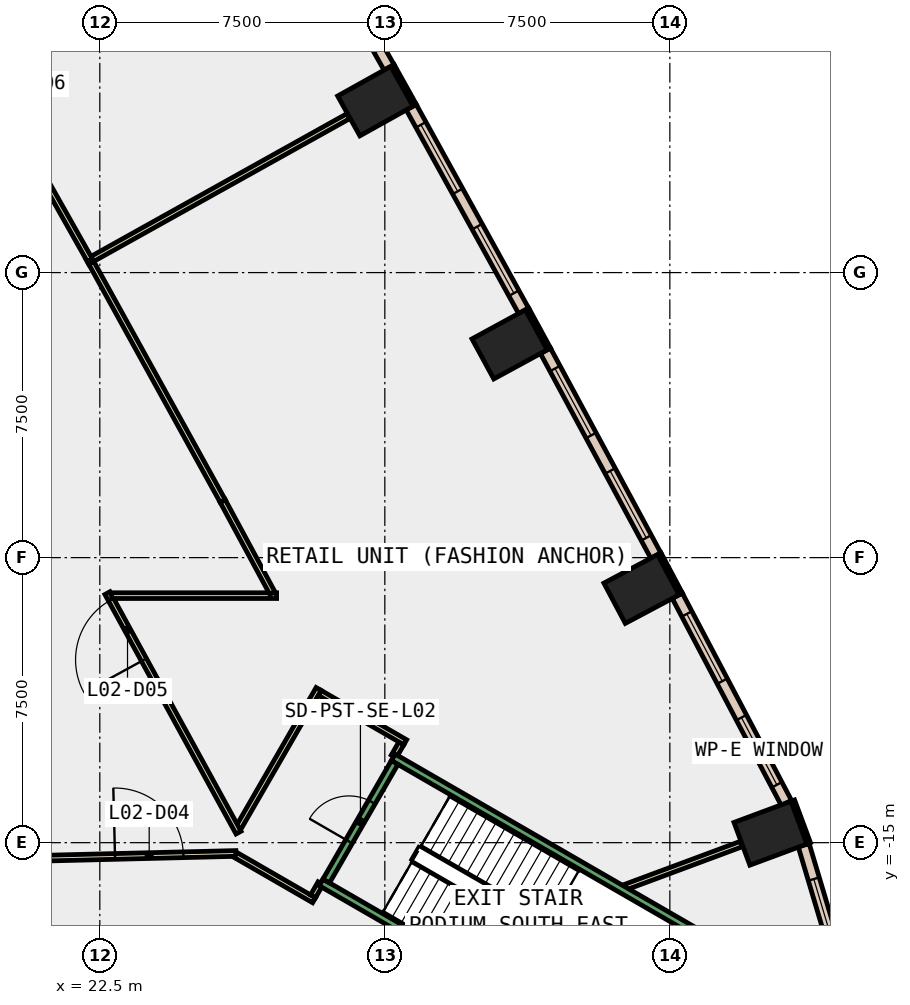
"""IFC4 building model, lengths in metres.
Left out: names, types, materials, properties, quantities, classifications, styles, units other than length and angle.
Written with IfcOpenShell. Run it as: python <this file> out.ifc"""

import sys

from ifc_helpers import new_model, si_unit, direction, frame, frame_2d, origin, origin_2d, place, context, subcontext, project, spatial, rectangle, extrude, element, fill, save


model = new_model("IFC4")
c1 = context("Model", 3, precision=1e-05, world=origin(), true_north=direction((0.0, 1.0)))
c2 = subcontext(c1, "Body", "Model", "MODEL_VIEW")
j1 = project(units=[si_unit("LENGTHUNIT", "METRE"), si_unit("PLANEANGLEUNIT", "RADIAN")], contexts=[c1])
p1 = place(None, origin())
s1 = spatial("IfcSite", under=j1, at=p1, CompositionType="ELEMENT")
p2 = place(p1, origin())
s2 = spatial("IfcBuilding", under=s1, at=p2, CompositionType="ELEMENT")
p3 = place(p2, frame((0.0, 0.0, 15.0)))
s3 = spatial("IfcBuildingStorey", under=s2, at=p3, CompositionType="ELEMENT", Elevation=15.0)
for number, where, z_axis, x_axis in (
    (1, (40.147, -14.751, -0.45), (0.0, 0.0, 1.0), (-0.348, 0.937, 0.0)),
    (2, (36.753, -8.325, -0.45), (0.0, 0.0, 1.0), (-0.469, 0.883, 0.0)),
    (3, (33.283, -1.889, -0.45), (0.0, 0.0, 1.0), (-0.478, 0.878, 0.0)),
    (4, (29.75, 4.512, -0.45), (0.0, 0.0, 1.0), (-0.487, 0.873, 0.0)),
):
    element("IfcColumn", number, at=place(p3, frame(where, z_axis=z_axis, x_axis=x_axis)), inside=s3, PredefinedType="COLUMN", context=c2, shape_type="SweptSolid", body=[
        extrude(rectangle(XDim=1.2, YDim=1.6, at=origin_2d()), origin(), (0.0, 0.0, 1.0), 5.0),
    ])
p4 = place(p3, frame((41.153, -15.018, 0.0), z_axis=(0.0, 0.0, 1.0), x_axis=(-0.348268249601, 0.937394914814, 0.0)))
e5 = element("IfcWall", 5, at=p4, inside=s3, PredefinedType="STANDARD", context=c2, shape_type="SweptSolid", body=[
    extrude(rectangle(XDim=1.2, YDim=0.1, at=frame_2d((0.6, 0.0))), origin(), (0.0, 0.0, 1.0), 4.55),
])
p5 = place(p3, frame((37.785, -8.456, 0.0), z_axis=(0.0, 0.0, 1.0), x_axis=(-0.469383408131, 0.882994459876, 0.0)))
e6 = element("IfcWall", 6, at=p5, inside=s3, PredefinedType="STANDARD", context=c2, shape_type="SweptSolid", body=[
    extrude(rectangle(XDim=1.199, YDim=0.1, at=frame_2d((0.6, 0.0))), origin(), (0.0, 0.0, 1.0), 4.55),
])
p6 = place(p3, frame((34.316, -2.01, 0.0), z_axis=(0.0, 0.0, 1.0), x_axis=(-0.478267644701, 0.878214131082, 0.0)))
e7 = element("IfcWall", 7, at=p6, inside=s3, PredefinedType="STANDARD", context=c2, shape_type="SweptSolid", body=[
    extrude(rectangle(XDim=1.2, YDim=0.1, at=frame_2d((0.6, 0.0))), origin(), (0.0, 0.0, 1.0), 4.55),
])
p7 = place(p3, frame((30.784, 4.402, 0.0), z_axis=(0.0, 0.0, 1.0), x_axis=(-0.486817526853, 0.873503689488, 0.0)))
e8 = element("IfcWall", 8, at=p7, inside=s3, PredefinedType="STANDARD", context=c2, shape_type="SweptSolid", body=[
    extrude(rectangle(XDim=1.2, YDim=0.1, at=frame_2d((0.6, 0.0))), origin(), (0.0, 0.0, 1.0), 4.55),
])
p8 = place(p3, frame((42.011, -18.382, 0.0), z_axis=(0.0, 0.0, 1.0), x_axis=(-0.285800575124, 0.958289116738, 0.0)))
e9 = element("IfcWall", 9, at=p8, inside=s3, PredefinedType="STANDARD", context=c2, shape_type="SweptSolid", body=[
    extrude(rectangle(XDim=3.46, YDim=0.3, at=frame_2d((1.73, 0.0))), origin(), (0.0, 0.0, 1.0), 4.55),
])
p9 = place(p8, frame((0.93, 0.0, 1.0)))
e10 = element("IfcOpeningElement", 10, at=p9, cuts=e9, PredefinedType="OPENING", context=c2, shape_type="SweptSolid", body=[
    extrude(rectangle(XDim=1.6, YDim=3.2, at=frame_2d((0.8, 1.6))), frame((0.0, 0.16, 0.0), z_axis=(0.0, -1.0, 0.0), x_axis=(1.0, 0.0, 0.0)), (0.0, 0.0, 1.0), 0.32),
])
p10 = place(p3, frame((40.568, -13.956, 0.0), z_axis=(0.0, 0.0, 1.0), x_axis=(-0.466125129602, 0.884718804792, 0.0)))
e11 = element("IfcWall", 11, at=p10, inside=s3, PredefinedType="STANDARD", context=c2, shape_type="SweptSolid", body=[
    extrude(rectangle(XDim=6.164, YDim=0.3, at=frame_2d((3.082, 0.0))), origin(), (0.0, 0.0, 1.0), 4.55),
])
p11 = place(p10, frame((0.541, 0.0, 1.0)))
e12 = element("IfcOpeningElement", 12, at=p11, cuts=e11, PredefinedType="OPENING", context=c2, shape_type="SweptSolid", body=[
    extrude(rectangle(XDim=2.0, YDim=3.2, at=frame_2d((1.0, 1.6))), frame((0.0, 0.16, 0.0), z_axis=(0.0, -1.0, 0.0), x_axis=(1.0, 0.0, 0.0)), (0.0, 0.0, 1.0), 0.32),
])
p12 = place(p10, frame((3.623, 0.0, 1.0)))
e13 = element("IfcOpeningElement", 13, at=p12, cuts=e11, PredefinedType="OPENING", context=c2, shape_type="SweptSolid", body=[
    extrude(rectangle(XDim=2.0, YDim=3.2, at=frame_2d((1.0, 1.6))), frame((0.0, 0.16, 0.0), z_axis=(0.0, -1.0, 0.0), x_axis=(1.0, 0.0, 0.0)), (0.0, 0.0, 1.0), 0.32),
])
p13 = place(p3, frame((37.131, -7.446, 0.0), z_axis=(0.0, 0.0, 1.0), x_axis=(-0.474584950749, 0.880209704856, 0.0)))
e14 = element("IfcWall", 14, at=p13, inside=s3, PredefinedType="STANDARD", context=c2, shape_type="SweptSolid", body=[
    extrude(rectangle(XDim=6.121, YDim=0.3, at=frame_2d((3.061, 0.0))), origin(), (0.0, 0.0, 1.0), 4.55),
])
p14 = place(p13, frame((0.53, 0.0, 1.0)))
e15 = element("IfcOpeningElement", 15, at=p14, cuts=e14, PredefinedType="OPENING", context=c2, shape_type="SweptSolid", body=[
    extrude(rectangle(XDim=2.0, YDim=3.2, at=frame_2d((1.0, 1.6))), frame((0.0, 0.16, 0.0), z_axis=(0.0, -1.0, 0.0), x_axis=(1.0, 0.0, 0.0)), (0.0, 0.0, 1.0), 0.32),
])
p15 = place(p13, frame((3.591, 0.0, 1.0)))
e16 = element("IfcOpeningElement", 16, at=p15, cuts=e14, PredefinedType="OPENING", context=c2, shape_type="SweptSolid", body=[
    extrude(rectangle(XDim=2.0, YDim=3.2, at=frame_2d((1.0, 1.6))), frame((0.0, 0.16, 0.0), z_axis=(0.0, -1.0, 0.0), x_axis=(1.0, 0.0, 0.0)), (0.0, 0.0, 1.0), 0.32),
])
p16 = place(p3, frame((33.652, -1.006, 0.0), z_axis=(0.0, 0.0, 1.0), x_axis=(-0.483233380559, 0.875491576152, 0.0)))
e17 = element("IfcWall", 17, at=p16, inside=s3, PredefinedType="STANDARD", context=c2, shape_type="SweptSolid", body=[
    extrude(rectangle(XDim=6.121, YDim=0.3, at=frame_2d((3.061, 0.0))), origin(), (0.0, 0.0, 1.0), 4.55),
])
p17 = place(p16, frame((0.53, 0.0, 1.0)))
e18 = element("IfcOpeningElement", 18, at=p17, cuts=e17, PredefinedType="OPENING", context=c2, shape_type="SweptSolid", body=[
    extrude(rectangle(XDim=2.0, YDim=3.2, at=frame_2d((1.0, 1.6))), frame((0.0, 0.16, 0.0), z_axis=(0.0, -1.0, 0.0), x_axis=(1.0, 0.0, 0.0)), (0.0, 0.0, 1.0), 0.32),
])
p18 = place(p16, frame((3.591, 0.0, 1.0)))
e19 = element("IfcOpeningElement", 19, at=p18, cuts=e17, PredefinedType="OPENING", context=c2, shape_type="SweptSolid", body=[
    extrude(rectangle(XDim=2.0, YDim=3.2, at=frame_2d((1.0, 1.6))), frame((0.0, 0.16, 0.0), z_axis=(0.0, -1.0, 0.0), x_axis=(1.0, 0.0, 0.0)), (0.0, 0.0, 1.0), 0.32),
])
p19 = place(p3, frame((30.111, 5.399, 0.0), z_axis=(0.0, 0.0, 1.0), x_axis=(-0.491661677717, 0.870786308267, 0.0)))
e20 = element("IfcWall", 20, at=p19, inside=s3, PredefinedType="STANDARD", context=c2, shape_type="SweptSolid", body=[
    extrude(rectangle(XDim=6.122, YDim=0.3, at=frame_2d((3.061, 0.0))), origin(), (0.0, 0.0, 1.0), 4.55),
])
p20 = place(p19, frame((0.531, 0.0, 1.0)))
e21 = element("IfcOpeningElement", 21, at=p20, cuts=e20, PredefinedType="OPENING", context=c2, shape_type="SweptSolid", body=[
    extrude(rectangle(XDim=2.0, YDim=3.2, at=frame_2d((1.0, 1.6))), frame((0.0, 0.16, 0.0), z_axis=(0.0, -1.0, 0.0), x_axis=(1.0, 0.0, 0.0)), (0.0, 0.0, 1.0), 0.32),
])
p21 = place(p19, frame((3.592, 0.0, 1.0)))
e22 = element("IfcOpeningElement", 22, at=p21, cuts=e20, PredefinedType="OPENING", context=c2, shape_type="SweptSolid", body=[
    extrude(rectangle(XDim=2.0, YDim=3.2, at=frame_2d((1.0, 1.6))), frame((0.0, 0.16, 0.0), z_axis=(0.0, -1.0, 0.0), x_axis=(1.0, 0.0, 0.0)), (0.0, 0.0, 1.0), 0.32),
])
p22 = place(p3, frame((36.334, -16.168, 0.0), z_axis=(0.0, 0.0, 1.0), x_axis=(0.937400028274, 0.348254485961, 0.0)))
e23 = element("IfcWall", 23, at=p22, inside=s3, PredefinedType="PARTITIONING", context=c2, shape_type="SweptSolid", body=[
    extrude(rectangle(XDim=3.247, YDim=0.15, at=frame_2d((1.624, 0.0))), origin(), (0.0, 0.0, 1.0), 4.55),
])
p23 = place(p3, frame((18.726, -15.465, 0.0), z_axis=(0.0, 0.0, 1.0), x_axis=(0.999696822244, 0.02462242057, 0.0)))
e24 = element("IfcWall", 24, at=p23, inside=s3, PredefinedType="PARTITIONING", context=c2, shape_type="SweptSolid", body=[
    extrude(rectangle(XDim=7.357, YDim=0.15, at=frame_2d((3.679, 0.0))), origin(), (0.0, 0.0, 1.0), 4.55),
])
p24 = place(p23, frame((4.175, 0.0, 0.0)))
e25 = element("IfcOpeningElement", 25, at=p24, cuts=e24, PredefinedType="OPENING", context=c2, shape_type="SweptSolid", body=[
    extrude(rectangle(XDim=1.8, YDim=2.1, at=frame_2d((0.9, 1.05))), frame((0.0, 0.085, 0.0), z_axis=(0.0, -1.0, 0.0), x_axis=(1.0, 0.0, 0.0)), (0.0, 0.0, 1.0), 0.17),
])
p25 = place(p3, frame((26.071, -15.323, 0.0), z_axis=(0.0, 0.0, 1.0), x_axis=(0.866182177769, -0.499728361128, 0.0)))
e26 = element("IfcWall", 26, at=p25, inside=s3, PredefinedType="PARTITIONING", context=c2, shape_type="SweptSolid", body=[
    extrude(rectangle(XDim=2.385, YDim=0.15, at=frame_2d((1.192, 0.0))), origin(), (0.0, 0.0, 1.0), 4.55),
])
p26 = place(p3, frame((28.11, -16.413, 0.0), z_axis=(0.0, 0.0, 1.0), x_axis=(0.498310290291, 0.866998762739, 0.0)))
e27 = element("IfcWall", 27, at=p26, inside=s3, PredefinedType="PARTITIONING", context=c2, shape_type="SweptSolid", body=[
    extrude(rectangle(XDim=0.399, YDim=0.15, at=frame_2d((0.2, 0.0))), origin(), (0.0, 0.0, 1.0), 4.55),
])
p27 = place(p3, frame((22.173, 0.287, 0.0), z_axis=(0.0, 0.0, 1.0), x_axis=(0.873380653813, 0.487038225959, 0.0)))
e28 = element("IfcWall", 28, at=p27, inside=s3, PredefinedType="PARTITIONING", context=c2, shape_type="SweptSolid", body=[
    extrude(rectangle(XDim=7.855, YDim=0.15, at=frame_2d((3.928, 0.0))), origin(), (0.0, 0.0, 1.0), 4.55),
])
p28 = place(p3, frame((30.235, -12.733, 0.0), z_axis=(0.0, 0.0, 1.0), x_axis=(0.499352927503, 0.866398669086, 0.0)))
e29 = element("IfcWall", 29, at=p28, inside=s3, PredefinedType="PARTITIONING", context=c2, shape_type="SweptSolid", body=[
    extrude(rectangle(XDim=0.4, YDim=0.15, at=frame_2d((0.2, 0.0))), origin(), (0.0, 0.0, 1.0), 4.55),
])
p29 = place(p3, frame((30.537, -12.358, 0.0), z_axis=(0.0, 0.0, 1.0), x_axis=(-0.866108986466, 0.499855202596, 0.0)))
e30 = element("IfcWall", 30, at=p29, inside=s3, PredefinedType="PARTITIONING", context=c2, shape_type="SweptSolid", body=[
    extrude(rectangle(XDim=2.6, YDim=0.15, at=frame_2d((1.3, 0.0))), origin(), (0.0, 0.0, 1.0), 4.55),
])
p30 = place(p3, frame((28.257, -10.956, 0.0), z_axis=(0.0, 0.0, 1.0), x_axis=(-0.500010096862, -0.86601957428, 0.0)))
e31 = element("IfcWall", 31, at=p30, inside=s3, PredefinedType="PARTITIONING", context=c2, shape_type="SweptSolid", body=[
    extrude(rectangle(XDim=4.212, YDim=0.15, at=frame_2d((2.106, 0.0))), origin(), (0.0, 0.0, 1.0), 4.55),
])
p31 = place(p3, frame((26.15, -14.735, 0.0), z_axis=(0.0, 0.0, 1.0), x_axis=(-0.480144660377, 0.877189321134, 0.0)))
e32 = element("IfcWall", 32, at=p31, inside=s3, PredefinedType="PARTITIONING", context=c2, shape_type="SweptSolid", body=[
    extrude(rectangle(XDim=7.183, YDim=0.15, at=frame_2d((3.592, 0.0))), origin(), (0.0, 0.0, 1.0), 4.55),
])
p32 = place(p31, frame((5.183, 0.0, 0.0)))
e33 = element("IfcOpeningElement", 33, at=p32, cuts=e32, PredefinedType="OPENING", context=c2, shape_type="SweptSolid", body=[
    extrude(rectangle(XDim=1.8, YDim=2.1, at=frame_2d((0.9, 1.05))), frame((0.0, 0.085, 0.0), z_axis=(0.0, -1.0, 0.0), x_axis=(1.0, 0.0, 0.0)), (0.0, 0.0, 1.0), 0.17),
])
p33 = place(p3, frame((22.812, -8.5, 0.0), z_axis=(0.0, 0.0, 1.0), x_axis=(1.0, 0.0, 0.0)))
e34 = element("IfcWall", 34, at=p33, inside=s3, PredefinedType="PARTITIONING", context=c2, shape_type="SweptSolid", body=[
    extrude(rectangle(XDim=4.34, YDim=0.15, at=frame_2d((2.17, 0.0))), origin(), (0.0, 0.0, 1.0), 4.55),
])
p34 = place(p3, frame((27.041, -8.434, 0.0), z_axis=(0.0, 0.0, 1.0), x_axis=(-0.474749604856, 0.880120907995, 0.0)))
e35 = element("IfcWall", 35, at=p34, inside=s3, PredefinedType="PARTITIONING", context=c2, shape_type="SweptSolid", body=[
    extrude(rectangle(XDim=2.755, YDim=0.15, at=frame_2d((1.378, 0.0))), origin(), (0.0, 0.0, 1.0), 4.55),
])
p35 = place(p3, frame((25.733, -6.009, 0.0), z_axis=(0.0, 0.0, 1.0), x_axis=(-0.483119749012, 0.875554286218, 0.0)))
e36 = element("IfcWall", 36, at=p35, inside=s3, PredefinedType="PARTITIONING", context=c2, shape_type="SweptSolid", body=[
    extrude(rectangle(XDim=7.153, YDim=0.15, at=frame_2d((3.577, 0.0))), origin(), (0.0, 0.0, 1.0), 4.55),
])
p36 = place(p3, frame((22.239, 0.324, 0.0), z_axis=(0.0, 0.0, 1.0), x_axis=(-0.491601807152, 0.870820109555, 0.0)))
e37 = element("IfcWall", 37, at=p36, inside=s3, PredefinedType="PARTITIONING", context=c2, shape_type="SweptSolid", body=[
    extrude(rectangle(XDim=7.225, YDim=0.15, at=frame_2d((3.613, 0.0))), origin(), (0.0, 0.0, 1.0), 4.55),
])
p37 = place(p36, frame((2.58, 0.0, 0.0)))
e38 = element("IfcOpeningElement", 38, at=p37, cuts=e37, PredefinedType="OPENING", context=c2, shape_type="SweptSolid", body=[
    extrude(rectangle(XDim=1.8, YDim=2.1, at=frame_2d((0.9, 1.05))), frame((0.0, 0.085, 0.0), z_axis=(0.0, -1.0, 0.0), x_axis=(1.0, 0.0, 0.0)), (0.0, 0.0, 1.0), 0.17),
])
for number, where, z_axis, x_axis in (
    (39, (28.322, -16.045, 0.0), (0.0, 0.0, 1.0), (0.866, -0.5, 0.0)),
    (40, (30.222, -12.755, 0.0), (0.0, 0.0, 1.0), (0.866, -0.5, 0.0)),
):
    element("IfcWall", number, at=place(p3, frame(where, z_axis=z_axis, x_axis=x_axis)), inside=s3, PredefinedType="STANDARD", context=c2, shape_type="SweptSolid", body=[
        extrude(rectangle(XDim=9.8, YDim=0.2, at=frame_2d((4.9, 0.0))), origin(), (0.0, 0.0, 1.0), 4.55),
    ])
p38 = place(p3, frame((28.458, -16.009, 0.0), z_axis=(0.0, 0.0, 1.0), x_axis=(0.499982693035, 0.866035395735, 0.0)))
e41 = element("IfcWall", 41, at=p38, inside=s3, PredefinedType="STANDARD", context=c2, shape_type="SweptSolid", body=[
    extrude(rectangle(XDim=3.6, YDim=0.2, at=frame_2d((1.8, 0.0))), origin(), (0.0, 0.0, 1.0), 4.55),
])
p39 = place(p38, frame((1.2, 0.0, 0.0)))
e42 = element("IfcOpeningElement", 42, at=p39, cuts=e41, PredefinedType="OPENING", context=c2, shape_type="SweptSolid", body=[
    extrude(rectangle(XDim=1.2, YDim=2.2, at=frame_2d((0.6, 1.1))), frame((0.0, 0.11, 0.0), z_axis=(0.0, -1.0, 0.0), x_axis=(1.0, 0.0, 0.0)), (0.0, 0.0, 1.0), 0.22),
])
p40 = place(p9, origin())
e43 = element("IfcWindow", 43, at=p40, inside=s3, PartitioningType="SINGLE_PANEL", PredefinedType="WINDOW", context=c2, shape_type="SweptSolid", body=[
    extrude(rectangle(XDim=1.6, YDim=3.2, at=frame_2d((0.8, 1.6))), frame((0.0, 0.03, 0.0), z_axis=(0.0, -1.0, 0.0), x_axis=(1.0, 0.0, 0.0)), (0.0, 0.0, 1.0), 0.06),
])
fill(e10, e43)
p41 = place(p11, origin())
e44 = element("IfcWindow", 44, at=p41, inside=s3, PartitioningType="SINGLE_PANEL", PredefinedType="WINDOW", context=c2, shape_type="SweptSolid", body=[
    extrude(rectangle(XDim=2.0, YDim=3.2, at=frame_2d((1.0, 1.6))), frame((0.0, 0.03, 0.0), z_axis=(0.0, -1.0, 0.0), x_axis=(1.0, 0.0, 0.0)), (0.0, 0.0, 1.0), 0.06),
])
fill(e12, e44)
p42 = place(p12, origin())
e45 = element("IfcWindow", 45, at=p42, inside=s3, PartitioningType="SINGLE_PANEL", PredefinedType="WINDOW", context=c2, shape_type="SweptSolid", body=[
    extrude(rectangle(XDim=2.0, YDim=3.2, at=frame_2d((1.0, 1.6))), frame((0.0, 0.03, 0.0), z_axis=(0.0, -1.0, 0.0), x_axis=(1.0, 0.0, 0.0)), (0.0, 0.0, 1.0), 0.06),
])
fill(e13, e45)
p43 = place(p14, origin())
e46 = element("IfcWindow", 46, at=p43, inside=s3, PartitioningType="SINGLE_PANEL", PredefinedType="WINDOW", context=c2, shape_type="SweptSolid", body=[
    extrude(rectangle(XDim=2.0, YDim=3.2, at=frame_2d((1.0, 1.6))), frame((0.0, 0.03, 0.0), z_axis=(0.0, -1.0, 0.0), x_axis=(1.0, 0.0, 0.0)), (0.0, 0.0, 1.0), 0.06),
])
fill(e15, e46)
p44 = place(p15, origin())
e47 = element("IfcWindow", 47, at=p44, inside=s3, PartitioningType="SINGLE_PANEL", PredefinedType="WINDOW", context=c2, shape_type="SweptSolid", body=[
    extrude(rectangle(XDim=2.0, YDim=3.2, at=frame_2d((1.0, 1.6))), frame((0.0, 0.03, 0.0), z_axis=(0.0, -1.0, 0.0), x_axis=(1.0, 0.0, 0.0)), (0.0, 0.0, 1.0), 0.06),
])
fill(e16, e47)
p45 = place(p17, origin())
e48 = element("IfcWindow", 48, at=p45, inside=s3, PartitioningType="SINGLE_PANEL", PredefinedType="WINDOW", context=c2, shape_type="SweptSolid", body=[
    extrude(rectangle(XDim=2.0, YDim=3.2, at=frame_2d((1.0, 1.6))), frame((0.0, 0.03, 0.0), z_axis=(0.0, -1.0, 0.0), x_axis=(1.0, 0.0, 0.0)), (0.0, 0.0, 1.0), 0.06),
])
fill(e18, e48)
p46 = place(p18, origin())
e49 = element("IfcWindow", 49, at=p46, inside=s3, PartitioningType="SINGLE_PANEL", PredefinedType="WINDOW", context=c2, shape_type="SweptSolid", body=[
    extrude(rectangle(XDim=2.0, YDim=3.2, at=frame_2d((1.0, 1.6))), frame((0.0, 0.03, 0.0), z_axis=(0.0, -1.0, 0.0), x_axis=(1.0, 0.0, 0.0)), (0.0, 0.0, 1.0), 0.06),
])
fill(e19, e49)
p47 = place(p24, origin())
e50 = element("IfcDoor", 50, at=p47, inside=s3, OperationType="DOUBLE_DOOR_SINGLE_SWING", PredefinedType="DOOR", context=c2, shape_type="SweptSolid", body=[
    extrude(rectangle(XDim=1.8, YDim=2.1, at=frame_2d((0.9, 1.05))), frame((0.0, 0.025, 0.0), z_axis=(0.0, -1.0, 0.0), x_axis=(1.0, 0.0, 0.0)), (0.0, 0.0, 1.0), 0.05),
])
fill(e25, e50)
p48 = place(p32, origin())
e51 = element("IfcDoor", 51, at=p48, inside=s3, OperationType="DOUBLE_DOOR_SINGLE_SWING", PredefinedType="DOOR", context=c2, shape_type="SweptSolid", body=[
    extrude(rectangle(XDim=1.8, YDim=2.1, at=frame_2d((0.9, 1.05))), frame((0.0, 0.025, 0.0), z_axis=(0.0, -1.0, 0.0), x_axis=(1.0, 0.0, 0.0)), (0.0, 0.0, 1.0), 0.05),
])
fill(e33, e51)
p49 = place(p39, origin())
e52 = element("IfcDoor", 52, at=p49, inside=s3, OperationType="SINGLE_SWING_LEFT", PredefinedType="DOOR", context=c2, shape_type="SweptSolid", body=[
    extrude(rectangle(XDim=1.2, YDim=2.2, at=frame_2d((0.6, 1.1))), frame((0.0, 0.025, 0.0), z_axis=(0.0, -1.0, 0.0), x_axis=(1.0, 0.0, 0.0)), (0.0, 0.0, 1.0), 0.05),
])
fill(e42, e52)
save(model, sys.argv[1])
